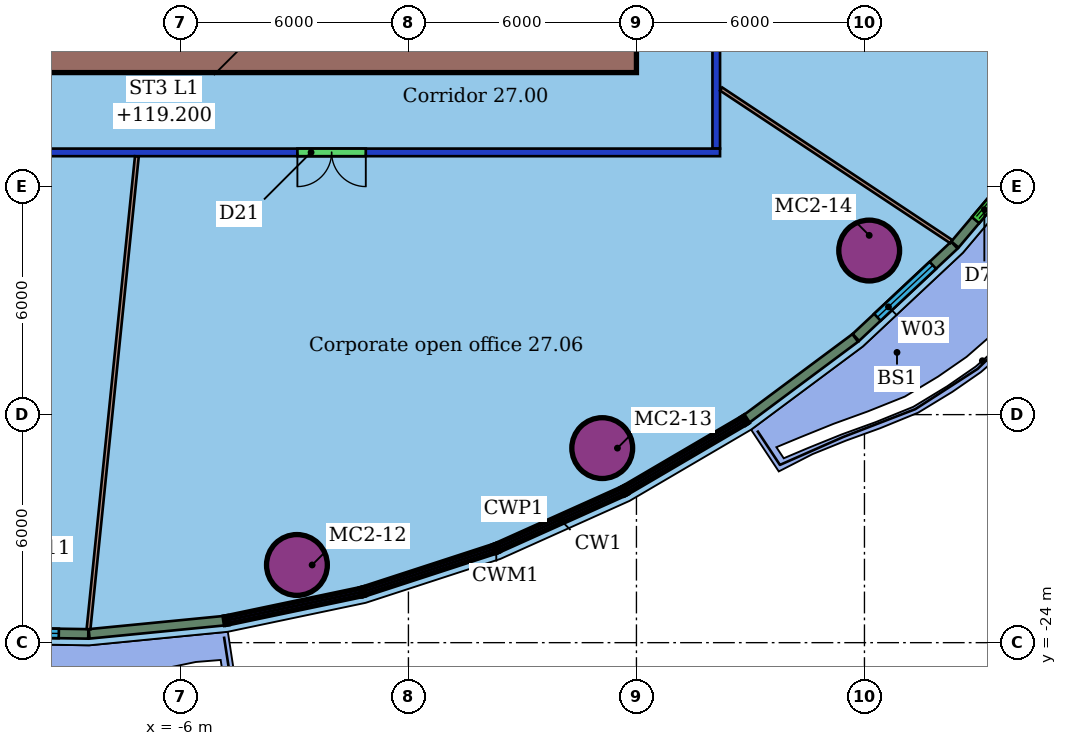
"""IFC4 building model, lengths in metres.
Left out: names, types, materials, properties, quantities, classifications, styles, units other than length and angle.
Written with IfcOpenShell. Run it as: python <this file> out.ifc"""

import sys

from ifc_helpers import new_model, si_unit, direction, frame, frame_2d, origin, origin_2d, place, context, subcontext, project, spatial, rectangle, hollow_circle, extrude, element, fill, save


model = new_model("IFC4")
c1 = context("Model", 3, precision=1e-05, world=origin(), true_north=direction((0.0, 1.0)))
c2 = subcontext(c1, "Body", "Model", "MODEL_VIEW")
j1 = project(units=[si_unit("LENGTHUNIT", "METRE"), si_unit("PLANEANGLEUNIT", "RADIAN")], contexts=[c1])
p1 = place(None, origin())
s1 = spatial("IfcSite", under=j1, at=p1, CompositionType="ELEMENT")
p2 = place(p1, origin())
s2 = spatial("IfcBuilding", under=s1, at=p2, CompositionType="ELEMENT")
p3 = place(p2, frame((0.0, 0.0, 117.4)))
s3 = spatial("IfcBuildingStorey", under=s2, at=p3, CompositionType="ELEMENT", Elevation=117.4)
for number, where, z_axis, x_axis in (
    (1, (-2.934, -21.956, 0.0), (0.0, 0.0, 1.0), (1.0, 0.0, 0.0)),
    (2, (5.1, -18.881, 0.0), (0.0, 0.0, 1.0), (1.0, 0.0, 0.0)),
    (3, (12.125, -13.683, 0.0), (0.0, 0.0, 1.0), (1.0, 0.0, 0.0)),
):
    element("IfcColumn", number, at=place(p3, frame(where, z_axis=z_axis, x_axis=x_axis)), inside=s3, PredefinedType="COLUMN", context=c2, shape_type="SweptSolid", body=[
        extrude(hollow_circle(Radius=0.8, WallThickness=0.055, at=origin_2d()), origin(), (0.0, 0.0, 1.0), 3.45),
    ])
p4 = place(p3, frame((8.2, -11.1, 0.0), z_axis=(0.0, 0.0, 1.0), x_axis=(-1.0, 0.0, 0.0)))
e4 = element("IfcWall", 4, at=p4, inside=s3, PredefinedType="PARTITIONING", context=c2, shape_type="SweptSolid", body=[
    extrude(rectangle(XDim=28.4, YDim=0.2, at=frame_2d((14.2, 0.0))), origin(), (0.0, 0.0, 1.0), 3.0),
])
p5 = place(p4, frame((18.882, 0.0, 0.0)))
e5 = element("IfcOpeningElement", 5, at=p5, cuts=e4, PredefinedType="OPENING", context=c2, shape_type="SweptSolid", body=[
    extrude(rectangle(XDim=1.8, YDim=2.1, at=frame_2d((0.9, 1.05))), frame((0.0, 0.11, 0.0), z_axis=(0.0, -1.0, 0.0), x_axis=(1.0, 0.0, 0.0)), (0.0, 0.0, 1.0), 0.22),
])
p6 = place(p4, frame((9.322, 0.0, 0.0)))
e6 = element("IfcOpeningElement", 6, at=p6, cuts=e4, PredefinedType="OPENING", context=c2, shape_type="SweptSolid", body=[
    extrude(rectangle(XDim=1.8, YDim=2.1, at=frame_2d((0.9, 1.05))), frame((0.0, 0.11, 0.0), z_axis=(0.0, -1.0, 0.0), x_axis=(1.0, 0.0, 0.0)), (0.0, 0.0, 1.0), 0.22),
])
p7 = place(p3, frame((8.1, 11.0, 0.0), z_axis=(0.0, 0.0, 1.0), x_axis=(0.0, -1.0, 0.0)))
e7 = element("IfcWall", 7, at=p7, inside=s3, PredefinedType="PARTITIONING", context=c2, shape_type="SweptSolid", body=[
    extrude(rectangle(XDim=22.0, YDim=0.2, at=frame_2d((11.0, 0.0))), origin(), (0.0, 0.0, 1.0), 3.0),
])
p8 = place(p7, frame((10.779, 0.0, 0.0)))
e8 = element("IfcOpeningElement", 8, at=p8, cuts=e7, PredefinedType="OPENING", context=c2, shape_type="SweptSolid", body=[
    extrude(rectangle(XDim=1.8, YDim=2.1, at=frame_2d((0.9, 1.05))), frame((0.0, 0.11, 0.0), z_axis=(0.0, -1.0, 0.0), x_axis=(1.0, 0.0, 0.0)), (0.0, 0.0, 1.0), 0.22),
])
p9 = place(p7, frame((3.555, 0.0, 0.0)))
e9 = element("IfcOpeningElement", 9, at=p9, cuts=e7, PredefinedType="OPENING", context=c2, shape_type="SweptSolid", body=[
    extrude(rectangle(XDim=1.8, YDim=2.1, at=frame_2d((0.9, 1.05))), frame((0.0, 0.11, 0.0), z_axis=(0.0, -1.0, 0.0), x_axis=(1.0, 0.0, 0.0)), (0.0, 0.0, 1.0), 0.22),
])
p10 = place(p3, frame((-8.418, -23.645, 0.0), z_axis=(0.0, 0.0, 1.0), x_axis=(0.101738063261, 0.994811221531, 0.0)))
e10 = element("IfcWall", 10, at=p10, inside=s3, PredefinedType="PARTITIONING", context=c2, shape_type="SweptSolid", body=[
    extrude(rectangle(XDim=12.505, YDim=0.1, at=frame_2d((6.252, 0.0))), origin(), (0.0, 0.0, 1.0), 3.45),
])
p11 = place(p3, frame((14.283, -13.447, 0.0), z_axis=(0.0, 0.0, 1.0), x_axis=(-0.833484611181, 0.552542670682, 0.0)))
e11 = element("IfcWall", 11, at=p11, inside=s3, PredefinedType="PARTITIONING", context=c2, shape_type="SweptSolid", body=[
    extrude(rectangle(XDim=7.266, YDim=0.1, at=frame_2d((3.633, 0.0))), origin(), (0.0, 0.0, 1.0), 3.45),
])
p12 = place(p3, frame((-11.975, -23.715, 0.0), z_axis=(0.0, 0.0, 1.0), x_axis=(0.999881433679, -0.015398655287, 0.0)))
e12 = element("IfcWall", 12, at=p12, inside=s3, PredefinedType="SOLIDWALL", context=c2, shape_type="SweptSolid", body=[
    extrude(rectangle(XDim=3.552, YDim=0.25, at=frame_2d((1.776, 0.0))), origin(), (0.0, 0.0, 1.0), 3.05),
])
p13 = place(p12, frame((0.776, 0.0, 0.9)))
e13 = element("IfcOpeningElement", 13, at=p13, cuts=e12, PredefinedType="OPENING", context=c2, shape_type="SweptSolid", body=[
    extrude(rectangle(XDim=2.0, YDim=2.1, at=frame_2d((1.0, 1.05))), frame((0.0, 0.135, 0.0), z_axis=(0.0, -1.0, 0.0), x_axis=(1.0, 0.0, 0.0)), (0.0, 0.0, 1.0), 0.27),
])
for number, where, z_axis, x_axis in (
    (14, (-8.402, -23.769, 0.0), (0.0, 0.0, 1.0), (0.995, 0.097, 0.0)),
    (15, (8.896, -18.112, 0.0), (0.0, 0.0, 1.0), (0.802, 0.597, 0.0)),
):
    element("IfcWall", number, at=place(p3, frame(where, z_axis=z_axis, x_axis=x_axis)), inside=s3, PredefinedType="SOLIDWALL", context=c2, shape_type="SweptSolid", body=[
        extrude(rectangle(XDim=3.567, YDim=0.25, at=frame_2d((1.783, 0.0))), origin(), (0.0, 0.0, 1.0), 3.05),
    ])
p14 = place(p3, frame((11.774, -15.968, 0.0), z_axis=(0.0, 0.0, 1.0), x_axis=(0.729895135737, 0.683559134843, 0.0)))
e16 = element("IfcWall", 16, at=p14, inside=s3, PredefinedType="SOLIDWALL", context=c2, shape_type="SweptSolid", body=[
    extrude(rectangle(XDim=3.551, YDim=0.25, at=frame_2d((1.776, 0.0))), origin(), (0.0, 0.0, 1.0), 3.05),
])
p15 = place(p14, frame((0.776, 0.0, 0.9)))
e17 = element("IfcOpeningElement", 17, at=p15, cuts=e16, PredefinedType="OPENING", context=c2, shape_type="SweptSolid", body=[
    extrude(rectangle(XDim=2.0, YDim=2.1, at=frame_2d((1.0, 1.05))), frame((0.0, 0.135, 0.0), z_axis=(0.0, -1.0, 0.0), x_axis=(1.0, 0.0, 0.0)), (0.0, 0.0, 1.0), 0.27),
])
p16 = place(p3, frame((14.381, -13.524, 0.0), z_axis=(0.0, 0.0, 1.0), x_axis=(0.645164421971, 0.764043760934, 0.0)))
e18 = element("IfcWall", 18, at=p16, inside=s3, PredefinedType="SOLIDWALL", context=c2, shape_type="SweptSolid", body=[
    extrude(rectangle(XDim=3.477, YDim=0.25, at=frame_2d((1.738, 0.0))), origin(), (0.0, 0.0, 1.0), 3.05),
])
p17 = place(p16, frame((0.839, 0.0, 0.0)))
e19 = element("IfcOpeningElement", 19, at=p17, cuts=e18, PredefinedType="OPENING", context=c2, shape_type="SweptSolid", body=[
    extrude(rectangle(XDim=1.8, YDim=2.4, at=frame_2d((0.9, 1.2))), frame((0.0, 0.135, 0.0), z_axis=(0.0, -1.0, 0.0), x_axis=(1.0, 0.0, 0.0)), (0.0, 0.0, 1.0), 0.27),
])
p18 = place(p3, frame((-18.0, -8.5, 0.0), z_axis=(0.0, 0.0, 1.0), x_axis=(1.0, 0.0, 0.0)))
e20 = element("IfcWall", 20, at=p18, inside=s3, PredefinedType="SHEAR", context=c2, shape_type="SweptSolid", body=[
    extrude(rectangle(XDim=24.0, YDim=1.0, at=frame_2d((12.0, 0.0))), origin(), (0.0, 0.0, 1.0), 3.3),
])
p19 = place(p18, frame((6.0, 0.0, 0.0)))
e21 = element("IfcOpeningElement", 21, at=p19, cuts=e20, PredefinedType="OPENING", context=c2, shape_type="SweptSolid", body=[
    extrude(rectangle(XDim=1.2, YDim=2.1, at=frame_2d((0.6, 1.05))), frame((0.0, 0.51, 0.0), z_axis=(0.0, -1.0, 0.0), x_axis=(1.0, 0.0, 0.0)), (0.0, 0.0, 1.0), 1.02),
])
p20 = place(p6, origin())
e22 = element("IfcDoor", 22, at=p20, inside=s3, OperationType="DOUBLE_DOOR_SINGLE_SWING", PredefinedType="DOOR", context=c2, shape_type="SweptSolid", body=[
    extrude(rectangle(XDim=1.8, YDim=2.1, at=frame_2d((0.9, 1.05))), frame((0.0, 0.025, 0.0), z_axis=(0.0, -1.0, 0.0), x_axis=(1.0, 0.0, 0.0)), (0.0, 0.0, 1.0), 0.05),
])
fill(e6, e22)
p21 = place(p13, origin())
e23 = element("IfcWindow", 23, at=p21, inside=s3, PartitioningType="SINGLE_PANEL", PredefinedType="WINDOW", context=c2, shape_type="SweptSolid", body=[
    extrude(rectangle(XDim=2.0, YDim=2.1, at=frame_2d((1.0, 1.05))), frame((0.0, 0.03, 0.0), z_axis=(0.0, -1.0, 0.0), x_axis=(1.0, 0.0, 0.0)), (0.0, 0.0, 1.0), 0.06),
])
fill(e13, e23)
p22 = place(p15, origin())
e24 = element("IfcWindow", 24, at=p22, inside=s3, PartitioningType="SINGLE_PANEL", PredefinedType="WINDOW", context=c2, shape_type="SweptSolid", body=[
    extrude(rectangle(XDim=2.0, YDim=2.1, at=frame_2d((1.0, 1.05))), frame((0.0, 0.03, 0.0), z_axis=(0.0, -1.0, 0.0), x_axis=(1.0, 0.0, 0.0)), (0.0, 0.0, 1.0), 0.06),
])
fill(e17, e24)
p23 = place(p17, origin())
e25 = element("IfcDoor", 25, at=p23, inside=s3, OperationType="DOUBLE_DOOR_SLIDING", PredefinedType="DOOR", context=c2, shape_type="SweptSolid", body=[
    extrude(rectangle(XDim=1.8, YDim=2.4, at=frame_2d((0.9, 1.2))), frame((0.0, 0.025, 0.0), z_axis=(0.0, -1.0, 0.0), x_axis=(1.0, 0.0, 0.0)), (0.0, 0.0, 1.0), 0.05),
])
fill(e19, e25)
save(model, sys.argv[1])
